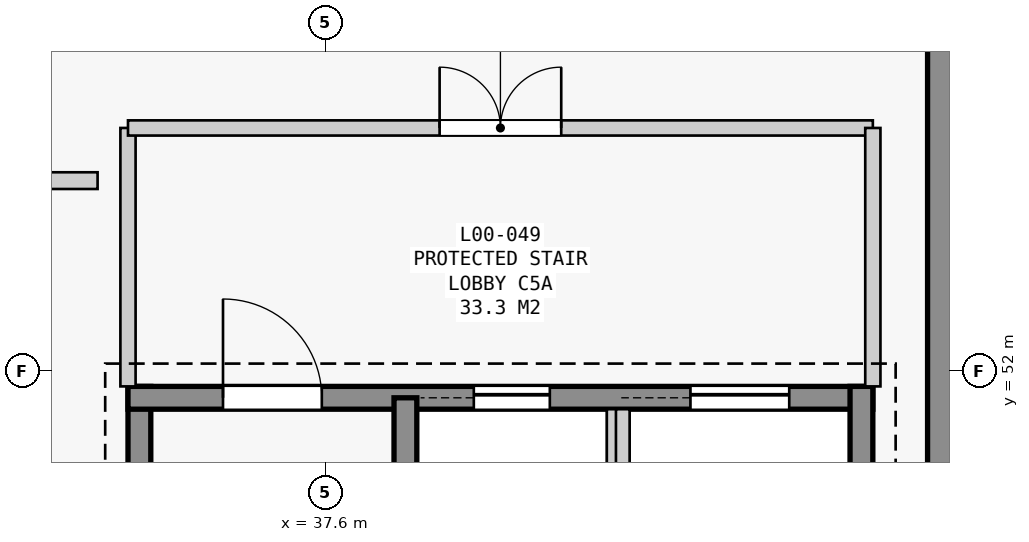
"""IFC4 building model, lengths in metres.
Left out: names, types, materials, properties, quantities, classifications, styles, units other than length and angle.
Written with IfcOpenShell. Run it as: python <this file> out.ifc"""

import sys

from ifc_helpers import new_model, si_unit, direction, frame, frame_2d, origin, place, context, subcontext, project, spatial, rectangle, extrude, element, fill, save


model = new_model("IFC4")
c1 = context("Model", 3, precision=1e-05, world=origin(), true_north=direction((0.0, 1.0)))
c2 = subcontext(c1, "Body", "Model", "MODEL_VIEW")
j1 = project(units=[si_unit("LENGTHUNIT", "METRE"), si_unit("PLANEANGLEUNIT", "RADIAN")], contexts=[c1])
p1 = place(None, origin())
s1 = spatial("IfcSite", under=j1, at=p1, CompositionType="ELEMENT")
p2 = place(p1, origin())
s2 = spatial("IfcBuilding", under=s1, at=p2, CompositionType="ELEMENT")
p3 = place(p2, origin())
s3 = spatial("IfcBuildingStorey", under=s2, at=p3, CompositionType="ELEMENT", Elevation=0.0)
p4 = place(p3, frame((45.71, 75.71, 0.0), z_axis=(0.0, 0.0, 1.0), x_axis=(0.0, -1.0, 0.0)))
e1 = element("IfcWall", 1, at=p4, inside=s3, PredefinedType="STANDARD", context=c2, shape_type="SweptSolid", body=[
    extrude(rectangle(XDim=33.02, YDim=0.38, at=frame_2d((16.51, 0.0))), origin(), (0.0, 0.0, 1.0), 5.14),
])
p5 = place(p3, frame((35.15, 43.7, 0.0), z_axis=(0.0, 0.0, 1.0), x_axis=(0.0, 1.0, 0.0)))
e2 = element("IfcWall", 2, at=p5, inside=s3, PredefinedType="SHEAR", context=c2, shape_type="SweptSolid", body=[
    extrude(rectangle(XDim=8.1, YDim=0.3, at=frame_2d((4.05, 0.0))), origin(), (0.0, 0.0, 1.0), 5.14),
])
p6 = place(p3, frame((35.0, 51.65, 0.0), z_axis=(0.0, 0.0, 1.0), x_axis=(1.0, 0.0, 0.0)))
e3 = element("IfcWall", 3, at=p6, inside=s3, PredefinedType="SHEAR", context=c2, shape_type="SweptSolid", body=[
    extrude(rectangle(XDim=9.8, YDim=0.3, at=frame_2d((4.9, 0.0))), origin(), (0.0, 0.0, 1.0), 5.14),
])
p7 = place(p6, frame((1.25, 0.0, 0.0)))
e4 = element("IfcOpeningElement", 4, at=p7, cuts=e3, PredefinedType="OPENING", context=c2, shape_type="SweptSolid", body=[
    extrude(rectangle(XDim=1.3, YDim=2.2, at=frame_2d((0.65, 1.1))), frame((0.0, 0.16, 0.0), z_axis=(0.0, -1.0, 0.0), x_axis=(1.0, 0.0, 0.0)), (0.0, 0.0, 1.0), 0.32),
])
p8 = place(p6, frame((4.55, 0.0, 0.0)))
e5 = element("IfcOpeningElement", 5, at=p8, cuts=e3, PredefinedType="OPENING", context=c2, shape_type="SweptSolid", body=[
    extrude(rectangle(XDim=1.0, YDim=2.15, at=frame_2d((0.5, 1.075))), frame((0.0, 0.16, 0.0), z_axis=(0.0, -1.0, 0.0), x_axis=(1.0, 0.0, 0.0)), (0.0, 0.0, 1.0), 0.32),
])
p9 = place(p6, frame((7.4, 0.0, 0.0)))
e6 = element("IfcOpeningElement", 6, at=p9, cuts=e3, PredefinedType="OPENING", context=c2, shape_type="SweptSolid", body=[
    extrude(rectangle(XDim=1.3, YDim=2.2, at=frame_2d((0.65, 1.1))), frame((0.0, 0.16, 0.0), z_axis=(0.0, -1.0, 0.0), x_axis=(1.0, 0.0, 0.0)), (0.0, 0.0, 1.0), 0.32),
])
p10 = place(p3, frame((44.65, 51.8, 0.0), z_axis=(0.0, 0.0, 1.0), x_axis=(0.0, -1.0, 0.0)))
e7 = element("IfcWall", 7, at=p10, inside=s3, PredefinedType="SHEAR", context=c2, shape_type="SweptSolid", body=[
    extrude(rectangle(XDim=8.1, YDim=0.3, at=frame_2d((4.05, 0.0))), origin(), (0.0, 0.0, 1.0), 5.14),
])
p11 = place(p3, frame((38.65, 43.85, 0.0), z_axis=(0.0, 0.0, 1.0), x_axis=(0.0, 1.0, 0.0)))
e8 = element("IfcWall", 8, at=p11, inside=s3, PredefinedType="SHEAR", context=c2, shape_type="SweptSolid", body=[
    extrude(rectangle(XDim=7.8, YDim=0.3, at=frame_2d((3.9, 0.0))), origin(), (0.0, 0.0, 1.0), 5.14),
])
p12 = place(p3, frame((41.39, 48.7, 0.0), z_axis=(0.0, 0.0, 1.0), x_axis=(0.0, 1.0, 0.0)))
e9 = element("IfcWall", 9, at=p12, inside=s3, PredefinedType="PARTITIONING", context=c2, shape_type="SweptSolid", body=[
    extrude(rectangle(XDim=2.8, YDim=0.18, at=frame_2d((1.4, 0.0))), origin(), (0.0, 0.0, 1.0), 5.14),
])
p13 = place(p3, frame((41.51, 48.2, 0.0), z_axis=(0.0, 0.0, 1.0), x_axis=(0.0, 1.0, 0.0)))
e10 = element("IfcWall", 10, at=p13, inside=s3, PredefinedType="PARTITIONING", context=c2, shape_type="SweptSolid", body=[
    extrude(rectangle(XDim=3.3, YDim=0.18, at=frame_2d((1.65, 0.0))), origin(), (0.0, 0.0, 1.0), 5.14),
])
p14 = place(p3, frame((35.0, 51.8, 0.0), z_axis=(0.0, 0.0, 1.0), x_axis=(0.0, 1.0, 0.0)))
e11 = element("IfcWall", 11, at=p14, inside=s3, PredefinedType="STANDARD", context=c2, shape_type="SweptSolid", body=[
    extrude(rectangle(XDim=3.4, YDim=0.2, at=frame_2d((1.7, 0.0))), origin(), (0.0, 0.0, 1.0), 5.14),
])
p15 = place(p3, frame((35.0, 55.2, 0.0), z_axis=(0.0, 0.0, 1.0), x_axis=(1.0, 0.0, 0.0)))
e12 = element("IfcWall", 12, at=p15, inside=s3, PredefinedType="STANDARD", context=c2, shape_type="SweptSolid", body=[
    extrude(rectangle(XDim=9.8, YDim=0.2, at=frame_2d((4.9, 0.0))), origin(), (0.0, 0.0, 1.0), 5.14),
])
p16 = place(p15, frame((4.1, 0.0, 0.0)))
e13 = element("IfcOpeningElement", 13, at=p16, cuts=e12, PredefinedType="OPENING", context=c2, shape_type="SweptSolid", body=[
    extrude(rectangle(XDim=1.6, YDim=2.2, at=frame_2d((0.8, 1.1))), frame((0.0, 0.11, 0.0), z_axis=(0.0, -1.0, 0.0), x_axis=(1.0, 0.0, 0.0)), (0.0, 0.0, 1.0), 0.22),
])
p17 = place(p3, frame((44.8, 55.2, 0.0), z_axis=(0.0, 0.0, 1.0), x_axis=(0.0, -1.0, 0.0)))
e14 = element("IfcWall", 14, at=p17, inside=s3, PredefinedType="STANDARD", context=c2, shape_type="SweptSolid", body=[
    extrude(rectangle(XDim=3.4, YDim=0.2, at=frame_2d((1.7, 0.0))), origin(), (0.0, 0.0, 1.0), 5.14),
])
p18 = place(p3, frame((17.9, 54.507, 0.0), z_axis=(0.0, 0.0, 1.0), x_axis=(1.0, 0.0, 0.0)))
e15 = element("IfcWall", 15, at=p18, inside=s3, PredefinedType="STANDARD", context=c2, shape_type="SweptSolid", body=[
    extrude(rectangle(XDim=16.7, YDim=0.22, at=frame_2d((8.35, 0.0))), origin(), (0.0, 0.0, 1.0), 4.47),
])
p19 = place(p7, origin())
e16 = element("IfcDoor", 16, at=p19, inside=s3, OperationType="SINGLE_SWING_LEFT", PredefinedType="DOOR", context=c2, shape_type="SweptSolid", body=[
    extrude(rectangle(XDim=1.3, YDim=2.2, at=frame_2d((0.65, 1.1))), frame((0.0, 0.025, 0.0), z_axis=(0.0, -1.0, 0.0), x_axis=(1.0, 0.0, 0.0)), (0.0, 0.0, 1.0), 0.05),
])
fill(e4, e16)
p20 = place(p8, origin())
e17 = element("IfcDoor", 17, at=p20, inside=s3, OperationType="SLIDING_TO_LEFT", PredefinedType="DOOR", context=c2, shape_type="SweptSolid", body=[
    extrude(rectangle(XDim=1.0, YDim=2.15, at=frame_2d((0.5, 1.075))), frame((0.0, 0.025, 0.0), z_axis=(0.0, -1.0, 0.0), x_axis=(1.0, 0.0, 0.0)), (0.0, 0.0, 1.0), 0.05),
])
fill(e5, e17)
p21 = place(p9, origin())
e18 = element("IfcDoor", 18, at=p21, inside=s3, OperationType="SLIDING_TO_LEFT", PredefinedType="DOOR", context=c2, shape_type="SweptSolid", body=[
    extrude(rectangle(XDim=1.3, YDim=2.2, at=frame_2d((0.65, 1.1))), frame((0.0, 0.025, 0.0), z_axis=(0.0, -1.0, 0.0), x_axis=(1.0, 0.0, 0.0)), (0.0, 0.0, 1.0), 0.05),
])
fill(e6, e18)
p22 = place(p16, origin())
e19 = element("IfcDoor", 19, at=p22, inside=s3, OperationType="DOUBLE_DOOR_SINGLE_SWING", PredefinedType="DOOR", context=c2, shape_type="SweptSolid", body=[
    extrude(rectangle(XDim=1.6, YDim=2.2, at=frame_2d((0.8, 1.1))), frame((0.0, 0.025, 0.0), z_axis=(0.0, -1.0, 0.0), x_axis=(1.0, 0.0, 0.0)), (0.0, 0.0, 1.0), 0.05),
])
fill(e13, e19)
save(model, sys.argv[1])
